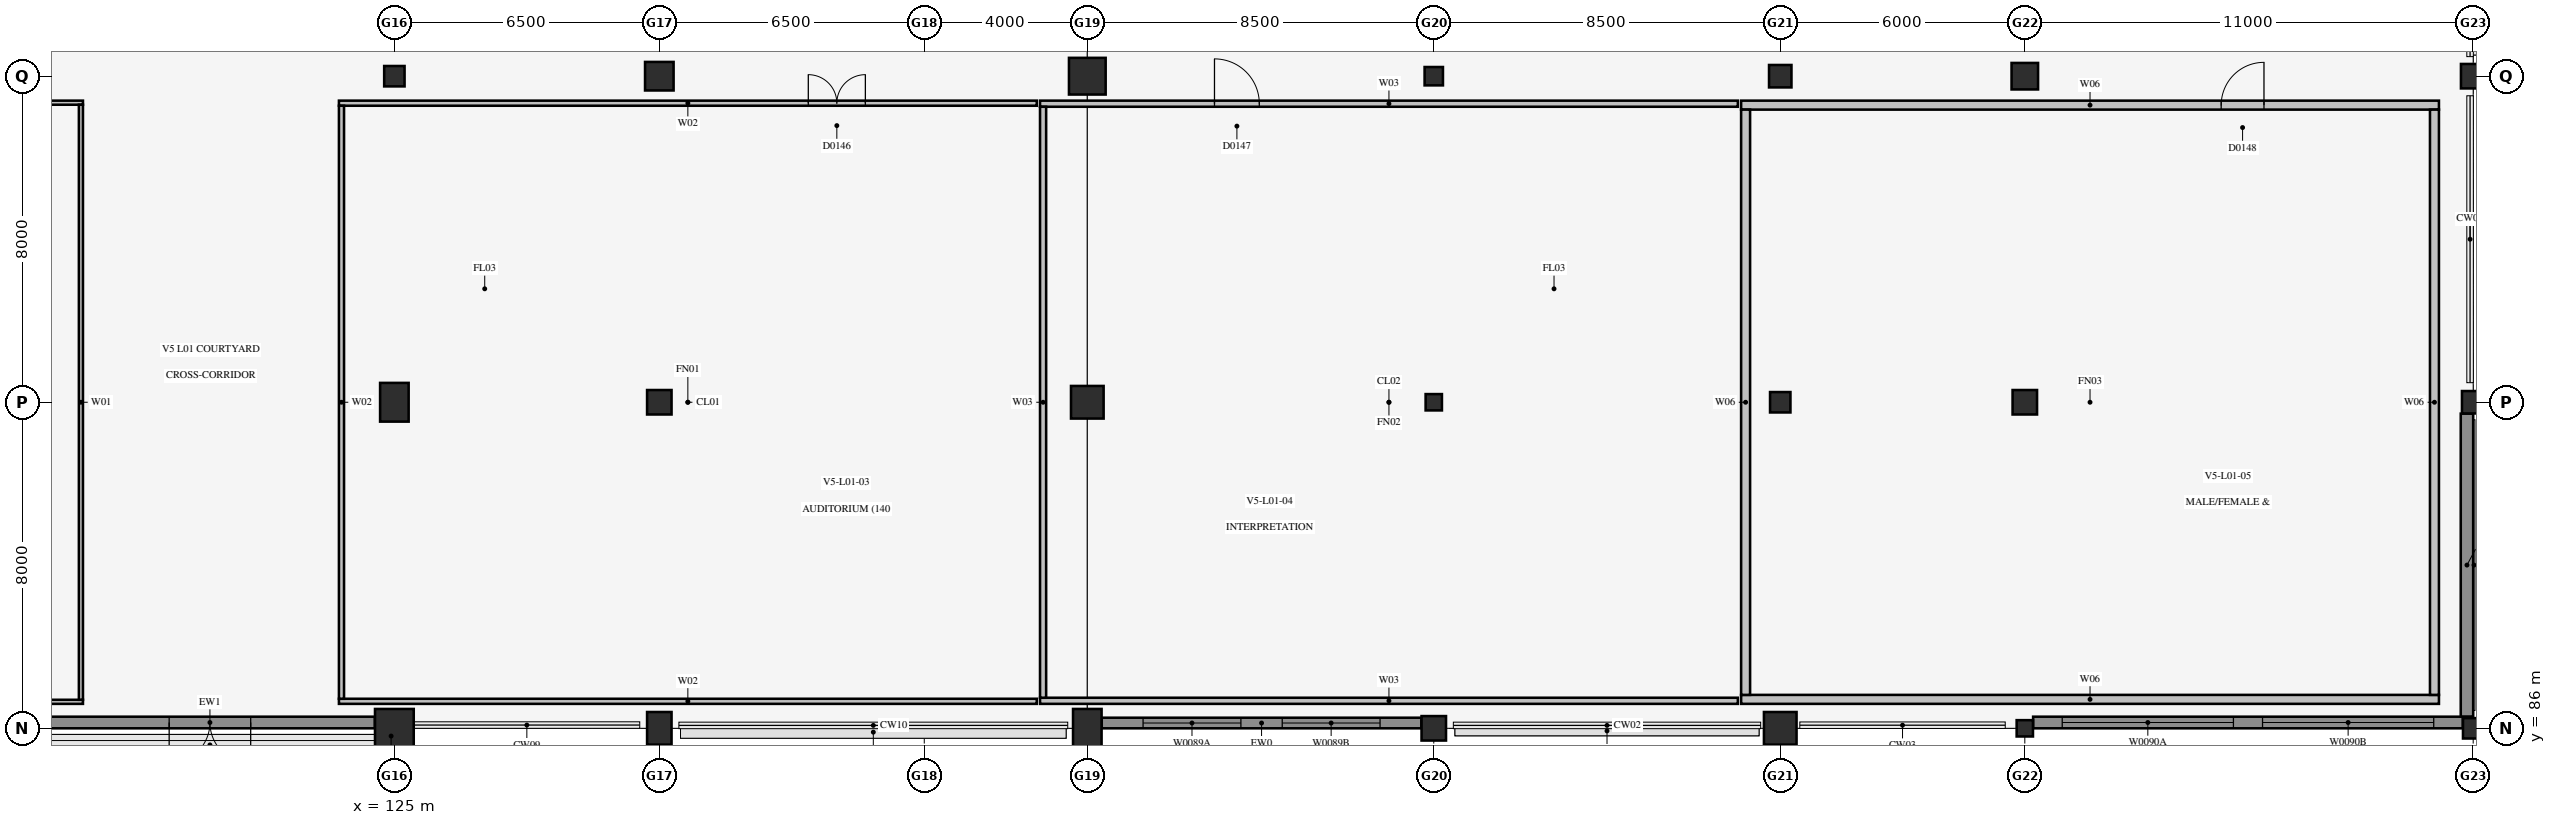
"""IFC4 building model, lengths in metres.
Left out: names, types, materials, properties, quantities, classifications, styles, units other than length and angle.
Written with IfcOpenShell. Run it as: python <this file> out.ifc"""

import sys

from ifc_helpers import new_model, si_unit, direction, frame, frame_2d, origin, origin_2d, place, context, subcontext, project, spatial, rectangle, circle, extrude, element, fill, save


model = new_model("IFC4")
c1 = context("Model", 3, precision=1e-05, world=origin(), true_north=direction((0.0, 1.0)))
c2 = subcontext(c1, "Body", "Model", "MODEL_VIEW")
j1 = project(units=[si_unit("LENGTHUNIT", "METRE"), si_unit("PLANEANGLEUNIT", "RADIAN")], contexts=[c1])
p1 = place(None, origin())
s1 = spatial("IfcSite", under=j1, at=p1, CompositionType="ELEMENT")
p2 = place(p1, origin())
s2 = spatial("IfcBuilding", under=s1, at=p2, CompositionType="ELEMENT")
p3 = place(p2, frame((0.0, 0.0, 5.4)))
s3 = spatial("IfcBuildingStorey", under=s2, at=p3, CompositionType="ELEMENT", Elevation=5.4)
p4 = place(p3, frame((125.0, 86.0, 0.0), z_axis=(0.0, 0.0, 1.0), x_axis=(1.0, 0.0, 0.0)))
e1 = element("IfcColumn", 1, at=p4, inside=s3, PredefinedType="COLUMN", context=c2, shape_type="SweptSolid", body=[
    extrude(rectangle(XDim=0.95, YDim=0.95, at=origin_2d()), origin(), (0.0, 0.0, 1.0), 4.8),
])
p5 = place(p3, frame((125.0, 94.0, 0.0), z_axis=(0.0, 0.0, 1.0), x_axis=(1.0, 0.0, 0.0)))
e2 = element("IfcColumn", 2, at=p5, inside=s3, PredefinedType="COLUMN", context=c2, shape_type="SweptSolid", body=[
    extrude(rectangle(XDim=0.7, YDim=0.95, at=origin_2d()), origin(), (0.0, 0.0, 1.0), 4.8),
])
p6 = place(p3, frame((125.0, 102.0, 0.0), z_axis=(0.0, 0.0, 1.0), x_axis=(1.0, 0.0, 0.0)))
e3 = element("IfcColumn", 3, at=p6, inside=s3, PredefinedType="COLUMN", context=c2, shape_type="SweptSolid", body=[
    extrude(circle(Radius=0.25, at=origin_2d()), origin(), (0.0, 0.0, 1.0), 4.8),
])
p7 = place(p3, frame((131.5, 86.0, 0.0), z_axis=(0.0, 0.0, 1.0), x_axis=(1.0, 0.0, 0.0)))
e4 = element("IfcColumn", 4, at=p7, inside=s3, PredefinedType="COLUMN", context=c2, shape_type="SweptSolid", body=[
    extrude(rectangle(XDim=0.6, YDim=0.8, at=origin_2d()), origin(), (0.0, 0.0, 1.0), 4.8),
])
p8 = place(p3, frame((131.5, 94.0, 0.0), z_axis=(0.0, 0.0, 1.0), x_axis=(1.0, 0.0, 0.0)))
e5 = element("IfcColumn", 5, at=p8, inside=s3, PredefinedType="COLUMN", context=c2, shape_type="SweptSolid", body=[
    extrude(circle(Radius=0.3, at=origin_2d()), origin(), (0.0, 0.0, 1.0), 4.8),
])
p9 = place(p3, frame((131.5, 102.0, 0.0), z_axis=(0.0, 0.0, 1.0), x_axis=(1.0, 0.0, 0.0)))
e6 = element("IfcColumn", 6, at=p9, inside=s3, PredefinedType="COLUMN", context=c2, shape_type="SweptSolid", body=[
    extrude(circle(Radius=0.35, at=origin_2d()), origin(), (0.0, 0.0, 1.0), 4.8),
])
p10 = place(p3, frame((142.0, 86.0, 0.0), z_axis=(0.0, 0.0, 1.0), x_axis=(1.0, 0.0, 0.0)))
e7 = element("IfcColumn", 7, at=p10, inside=s3, PredefinedType="COLUMN", context=c2, shape_type="SweptSolid", body=[
    extrude(rectangle(XDim=0.7, YDim=0.95, at=origin_2d()), origin(), (0.0, 0.0, 1.0), 4.8),
])
p11 = place(p3, frame((142.0, 94.0, 0.0), z_axis=(0.0, 0.0, 1.0), x_axis=(1.0, 0.0, 0.0)))
e8 = element("IfcColumn", 8, at=p11, inside=s3, PredefinedType="COLUMN", context=c2, shape_type="SweptSolid", body=[
    extrude(circle(Radius=0.4, at=origin_2d()), origin(), (0.0, 0.0, 1.0), 4.8),
])
p12 = place(p3, frame((142.0, 102.0, 0.0), z_axis=(0.0, 0.0, 1.0), x_axis=(1.0, 0.0, 0.0)))
e9 = element("IfcColumn", 9, at=p12, inside=s3, PredefinedType="COLUMN", context=c2, shape_type="SweptSolid", body=[
    extrude(circle(Radius=0.45, at=origin_2d()), origin(), (0.0, 0.0, 1.0), 4.8),
])
p13 = place(p3, frame((150.5, 86.0, 0.0), z_axis=(0.0, 0.0, 1.0), x_axis=(1.0, 0.0, 0.0)))
e10 = element("IfcColumn", 10, at=p13, inside=s3, PredefinedType="COLUMN", context=c2, shape_type="SweptSolid", body=[
    extrude(circle(Radius=0.3, at=origin_2d()), origin(), (0.0, 0.0, 1.0), 4.8),
])
p14 = place(p3, frame((150.5, 94.0, 0.0), z_axis=(0.0, 0.0, 1.0), x_axis=(1.0, 0.0, 0.0)))
e11 = element("IfcColumn", 11, at=p14, inside=s3, PredefinedType="COLUMN", context=c2, shape_type="SweptSolid", body=[
    extrude(rectangle(XDim=0.4, YDim=0.4, at=origin_2d()), origin(), (0.0, 0.0, 1.0), 4.8),
])
p15 = place(p3, frame((150.5, 102.0, 0.0), z_axis=(0.0, 0.0, 1.0), x_axis=(1.0, 0.0, 0.0)))
e12 = element("IfcColumn", 12, at=p15, inside=s3, PredefinedType="COLUMN", context=c2, shape_type="SweptSolid", body=[
    extrude(rectangle(XDim=0.45, YDim=0.45, at=origin_2d()), origin(), (0.0, 0.0, 1.0), 4.8),
])
p16 = place(p3, frame((159.0, 86.0, 0.0), z_axis=(0.0, 0.0, 1.0), x_axis=(1.0, 0.0, 0.0)))
e13 = element("IfcColumn", 13, at=p16, inside=s3, PredefinedType="COLUMN", context=c2, shape_type="SweptSolid", body=[
    extrude(circle(Radius=0.4, at=origin_2d()), origin(), (0.0, 0.0, 1.0), 4.8),
])
p17 = place(p3, frame((159.0, 94.0, 0.0), z_axis=(0.0, 0.0, 1.0), x_axis=(1.0, 0.0, 0.0)))
e14 = element("IfcColumn", 14, at=p17, inside=s3, PredefinedType="COLUMN", context=c2, shape_type="SweptSolid", body=[
    extrude(rectangle(XDim=0.5, YDim=0.5, at=origin_2d()), origin(), (0.0, 0.0, 1.0), 4.8),
])
p18 = place(p3, frame((159.0, 102.0, 0.0), z_axis=(0.0, 0.0, 1.0), x_axis=(1.0, 0.0, 0.0)))
e15 = element("IfcColumn", 15, at=p18, inside=s3, PredefinedType="COLUMN", context=c2, shape_type="SweptSolid", body=[
    extrude(rectangle(XDim=0.55, YDim=0.55, at=origin_2d()), origin(), (0.0, 0.0, 1.0), 4.8),
])
p19 = place(p3, frame((165.0, 86.0, 0.0), z_axis=(0.0, 0.0, 1.0), x_axis=(1.0, 0.0, 0.0)))
e16 = element("IfcColumn", 16, at=p19, inside=s3, PredefinedType="COLUMN", context=c2, shape_type="SweptSolid", body=[
    extrude(rectangle(XDim=0.4, YDim=0.4, at=origin_2d()), origin(), (0.0, 0.0, 1.0), 4.8),
])
p20 = place(p3, frame((165.0, 94.0, 0.0), z_axis=(0.0, 0.0, 1.0), x_axis=(1.0, 0.0, 0.0)))
e17 = element("IfcColumn", 17, at=p20, inside=s3, PredefinedType="COLUMN", context=c2, shape_type="SweptSolid", body=[
    extrude(rectangle(XDim=0.6, YDim=0.6, at=origin_2d()), origin(), (0.0, 0.0, 1.0), 4.8),
])
p21 = place(p3, frame((165.0, 102.0, 0.0), z_axis=(0.0, 0.0, 1.0), x_axis=(1.0, 0.0, 0.0)))
e18 = element("IfcColumn", 18, at=p21, inside=s3, PredefinedType="COLUMN", context=c2, shape_type="SweptSolid", body=[
    extrude(rectangle(XDim=0.65, YDim=0.65, at=origin_2d()), origin(), (0.0, 0.0, 1.0), 4.8),
])
p22 = place(p3, frame((176.0, 86.0, 0.0), z_axis=(0.0, 0.0, 1.0), x_axis=(1.0, 0.0, 0.0)))
e19 = element("IfcColumn", 19, at=p22, inside=s3, PredefinedType="COLUMN", context=c2, shape_type="SweptSolid", body=[
    extrude(rectangle(XDim=0.5, YDim=0.5, at=origin_2d()), origin(), (0.0, 0.0, 1.0), 4.8),
])
p23 = place(p3, frame((176.0, 94.0, 0.0), z_axis=(0.0, 0.0, 1.0), x_axis=(1.0, 0.0, 0.0)))
e20 = element("IfcColumn", 20, at=p23, inside=s3, PredefinedType="COLUMN", context=c2, shape_type="SweptSolid", body=[
    extrude(rectangle(XDim=0.55, YDim=0.55, at=origin_2d()), origin(), (0.0, 0.0, 1.0), 4.8),
])
p24 = place(p3, frame((176.0, 102.0, 0.0), z_axis=(0.0, 0.0, 1.0), x_axis=(1.0, 0.0, 0.0)))
e21 = element("IfcColumn", 21, at=p24, inside=s3, PredefinedType="COLUMN", context=c2, shape_type="SweptSolid", body=[
    extrude(rectangle(XDim=0.6, YDim=0.6, at=origin_2d()), origin(), (0.0, 0.0, 1.0), 4.8),
])
p25 = place(p3, frame((108.14, 86.65, 0.0), z_axis=(0.0, 0.0, 1.0), x_axis=(1.0, 0.0, 0.0)))
e22 = element("IfcWall", 22, at=p25, inside=s3, PredefinedType="PARTITIONING", context=c2, shape_type="SweptSolid", body=[
    extrude(rectangle(XDim=9.22, YDim=0.1, at=frame_2d((4.61, 0.0))), origin(), (0.0, 0.0, 1.0), 4.545),
])
p26 = place(p3, frame((108.14, 101.35, 0.0), z_axis=(0.0, 0.0, 1.0), x_axis=(1.0, 0.0, 0.0)))
e23 = element("IfcWall", 23, at=p26, inside=s3, PredefinedType="PARTITIONING", context=c2, shape_type="SweptSolid", body=[
    extrude(rectangle(XDim=9.22, YDim=0.1, at=frame_2d((4.61, 0.0))), origin(), (0.0, 0.0, 1.0), 4.545),
])
p27 = place(p26, frame((3.275, 0.0, 0.0)))
e24 = element("IfcOpeningElement", 24, at=p27, cuts=e23, PredefinedType="OPENING", context=c2, shape_type="SweptSolid", body=[
    extrude(rectangle(XDim=0.95, YDim=2.15, at=frame_2d((0.475, 1.075))), frame((0.0, 0.062, 0.0), z_axis=(0.0, -1.0, 0.0), x_axis=(1.0, 0.0, 0.0)), (0.0, 0.0, 1.0), 0.124),
])
p28 = place(p3, frame((117.31, 86.7, 0.0), z_axis=(0.0, 0.0, 1.0), x_axis=(0.0, 1.0, 0.0)))
e25 = element("IfcWall", 25, at=p28, inside=s3, PredefinedType="PARTITIONING", context=c2, shape_type="SweptSolid", body=[
    extrude(rectangle(XDim=14.6, YDim=0.1, at=frame_2d((7.3, 0.0))), origin(), (0.0, 0.0, 1.0), 4.545),
])
p29 = place(p3, frame((123.64, 86.663, 0.0), z_axis=(0.0, 0.0, 1.0), x_axis=(1.0, 0.0, 0.0)))
e26 = element("IfcWall", 26, at=p29, inside=s3, PredefinedType="PARTITIONING", context=c2, shape_type="SweptSolid", body=[
    extrude(rectangle(XDim=17.12, YDim=0.125, at=frame_2d((8.56, 0.0))), origin(), (0.0, 0.0, 1.0), 4.545),
])
p30 = place(p3, frame((123.64, 101.337, 0.0), z_axis=(0.0, 0.0, 1.0), x_axis=(1.0, 0.0, 0.0)))
e27 = element("IfcWall", 27, at=p30, inside=s3, PredefinedType="PARTITIONING", context=c2, shape_type="SweptSolid", body=[
    extrude(rectangle(XDim=17.12, YDim=0.125, at=frame_2d((8.56, 0.0))), origin(), (0.0, 0.0, 1.0), 4.545),
])
p31 = place(p30, frame((11.515, 0.0, 0.0)))
e28 = element("IfcOpeningElement", 28, at=p31, cuts=e27, PredefinedType="OPENING", context=c2, shape_type="SweptSolid", body=[
    extrude(rectangle(XDim=1.4, YDim=2.2, at=frame_2d((0.7, 1.1))), frame((0.0, 0.074, 0.0), z_axis=(0.0, -1.0, 0.0), x_axis=(1.0, 0.0, 0.0)), (0.0, 0.0, 1.0), 0.149),
])
p32 = place(p3, frame((123.702, 86.725, 0.0), z_axis=(0.0, 0.0, 1.0), x_axis=(0.0, 1.0, 0.0)))
e29 = element("IfcWall", 29, at=p32, inside=s3, PredefinedType="PARTITIONING", context=c2, shape_type="SweptSolid", body=[
    extrude(rectangle(XDim=14.55, YDim=0.125, at=frame_2d((7.275, 0.0))), origin(), (0.0, 0.0, 1.0), 4.545),
])
p33 = place(p3, frame((140.84, 86.675, 0.0), z_axis=(0.0, 0.0, 1.0), x_axis=(1.0, 0.0, 0.0)))
e30 = element("IfcWall", 30, at=p33, inside=s3, PredefinedType="PARTITIONING", context=c2, shape_type="SweptSolid", body=[
    extrude(rectangle(XDim=17.12, YDim=0.15, at=frame_2d((8.56, 0.0))), origin(), (0.0, 0.0, 1.0), 4.545),
])
p34 = place(p3, frame((140.84, 101.325, 0.0), z_axis=(0.0, 0.0, 1.0), x_axis=(1.0, 0.0, 0.0)))
e31 = element("IfcWall", 31, at=p34, inside=s3, PredefinedType="PARTITIONING", context=c2, shape_type="SweptSolid", body=[
    extrude(rectangle(XDim=17.12, YDim=0.15, at=frame_2d((8.56, 0.0))), origin(), (0.0, 0.0, 1.0), 4.545),
])
p35 = place(p34, frame((4.28, 0.0, 0.0)))
e32 = element("IfcOpeningElement", 32, at=p35, cuts=e31, PredefinedType="OPENING", context=c2, shape_type="SweptSolid", body=[
    extrude(rectangle(XDim=1.1, YDim=2.25, at=frame_2d((0.55, 1.125))), frame((0.0, 0.087, 0.0), z_axis=(0.0, -1.0, 0.0), x_axis=(1.0, 0.0, 0.0)), (0.0, 0.0, 1.0), 0.174),
])
p36 = place(p3, frame((140.915, 86.75, 0.0), z_axis=(0.0, 0.0, 1.0), x_axis=(0.0, 1.0, 0.0)))
e33 = element("IfcWall", 33, at=p36, inside=s3, PredefinedType="PARTITIONING", context=c2, shape_type="SweptSolid", body=[
    extrude(rectangle(XDim=14.5, YDim=0.15, at=frame_2d((7.25, 0.0))), origin(), (0.0, 0.0, 1.0), 4.545),
])
p37 = place(p3, frame((158.04, 86.71, 0.0), z_axis=(0.0, 0.0, 1.0), x_axis=(1.0, 0.0, 0.0)))
e34 = element("IfcWall", 34, at=p37, inside=s3, PredefinedType="PLUMBINGWALL", context=c2, shape_type="SweptSolid", body=[
    extrude(rectangle(XDim=17.12, YDim=0.22, at=frame_2d((8.56, 0.0))), origin(), (0.0, 0.0, 1.0), 4.545),
])
p38 = place(p3, frame((158.04, 101.29, 0.0), z_axis=(0.0, 0.0, 1.0), x_axis=(1.0, 0.0, 0.0)))
e35 = element("IfcWall", 35, at=p38, inside=s3, PredefinedType="PLUMBINGWALL", context=c2, shape_type="SweptSolid", body=[
    extrude(rectangle(XDim=17.12, YDim=0.22, at=frame_2d((8.56, 0.0))), origin(), (0.0, 0.0, 1.0), 4.545),
])
p39 = place(p38, frame((11.778, 0.0, 0.0)))
e36 = element("IfcOpeningElement", 36, at=p39, cuts=e35, PredefinedType="OPENING", context=c2, shape_type="SweptSolid", body=[
    extrude(rectangle(XDim=1.05, YDim=2.15, at=frame_2d((0.525, 1.075))), frame((0.0, 0.122, 0.0), z_axis=(0.0, -1.0, 0.0), x_axis=(1.0, 0.0, 0.0)), (0.0, 0.0, 1.0), 0.244),
])
for number, where, z_axis, x_axis in (
    (37, (175.05, 86.82, 0.0), (0.0, 0.0, 1.0), (0.0, 1.0, 0.0)),
    (38, (158.15, 86.82, 0.0), (0.0, 0.0, 1.0), (0.0, 1.0, 0.0)),
):
    element("IfcWall", number, at=place(p3, frame(where, z_axis=z_axis, x_axis=x_axis)), inside=s3, PredefinedType="PLUMBINGWALL", context=c2, shape_type="SweptSolid", body=[
        extrude(rectangle(XDim=14.36, YDim=0.22, at=frame_2d((7.18, 0.0))), origin(), (0.0, 0.0, 1.0), 4.545),
    ])
p40 = place(p3, frame((116.429, 86.143, 0.0), z_axis=(0.0, 0.0, 1.0), x_axis=(1.0, 0.0, 0.0)))
e39 = element("IfcWall", 39, at=p40, inside=s3, PredefinedType="SOLIDWALL", context=c2, shape_type="SweptSolid", body=[
    extrude(rectangle(XDim=8.092, YDim=0.285, at=frame_2d((4.046, 0.0))), origin(), (0.0, 0.0, 1.0), 3.918),
])
p41 = place(p40, frame((3.046, 0.0, 0.0)))
e40 = element("IfcOpeningElement", 40, at=p41, cuts=e39, PredefinedType="OPENING", context=c2, shape_type="SweptSolid", body=[
    extrude(rectangle(XDim=2.0, YDim=2.4, at=frame_2d((1.0, 1.2))), frame((0.0, 0.154, 0.0), z_axis=(0.0, -1.0, 0.0), x_axis=(1.0, 0.0, 0.0)), (0.0, 0.0, 1.0), 0.309),
])
p42 = place(p3, frame((142.354, 86.13, 0.0), z_axis=(0.0, 0.0, 1.0), x_axis=(1.0, 0.0, 0.0)))
e41 = element("IfcWall", 41, at=p42, inside=s3, PredefinedType="SOLIDWALL", context=c2, shape_type="SweptSolid", body=[
    extrude(rectangle(XDim=7.842, YDim=0.26, at=frame_2d((3.921, 0.0))), origin(), (0.0, 0.0, 1.0), 3.994),
])
p43 = place(p42, frame((1.014, 0.0, 0.95)))
e42 = element("IfcOpeningElement", 42, at=p43, cuts=e41, PredefinedType="OPENING", context=c2, shape_type="SweptSolid", body=[
    extrude(rectangle(XDim=2.4, YDim=2.1, at=frame_2d((1.2, 1.05))), frame((0.0, 0.142, 0.0), z_axis=(0.0, -1.0, 0.0), x_axis=(1.0, 0.0, 0.0)), (0.0, 0.0, 1.0), 0.284),
])
p44 = place(p42, frame((4.428, 0.0, 0.95)))
e43 = element("IfcOpeningElement", 43, at=p44, cuts=e41, PredefinedType="OPENING", context=c2, shape_type="SweptSolid", body=[
    extrude(rectangle(XDim=2.4, YDim=2.1, at=frame_2d((1.2, 1.05))), frame((0.0, 0.142, 0.0), z_axis=(0.0, -1.0, 0.0), x_axis=(1.0, 0.0, 0.0)), (0.0, 0.0, 1.0), 0.284),
])
p45 = place(p3, frame((165.204, 86.143, 0.0), z_axis=(0.0, 0.0, 1.0), x_axis=(1.0, 0.0, 0.0)))
e44 = element("IfcWall", 44, at=p45, inside=s3, PredefinedType="SOLIDWALL", context=c2, shape_type="SweptSolid", body=[
    extrude(rectangle(XDim=10.542, YDim=0.285, at=frame_2d((5.271, 0.0))), origin(), (0.0, 0.0, 1.0), 4.07),
])
p46 = place(p45, frame((0.714, 0.0, 0.95)))
e45 = element("IfcOpeningElement", 45, at=p46, cuts=e44, PredefinedType="OPENING", context=c2, shape_type="SweptSolid", body=[
    extrude(rectangle(XDim=4.2, YDim=2.1, at=frame_2d((2.1, 1.05))), frame((0.0, 0.154, 0.0), z_axis=(0.0, -1.0, 0.0), x_axis=(1.0, 0.0, 0.0)), (0.0, 0.0, 1.0), 0.309),
])
p47 = place(p45, frame((5.628, 0.0, 0.95)))
e46 = element("IfcOpeningElement", 46, at=p47, cuts=e44, PredefinedType="OPENING", context=c2, shape_type="SweptSolid", body=[
    extrude(rectangle(XDim=4.2, YDim=2.1, at=frame_2d((2.1, 1.05))), frame((0.0, 0.154, 0.0), z_axis=(0.0, -1.0, 0.0), x_axis=(1.0, 0.0, 0.0)), (0.0, 0.0, 1.0), 0.309),
])
p48 = place(p3, frame((175.847, 86.289, 0.0), z_axis=(0.0, 0.0, 1.0), x_axis=(0.0, 1.0, 0.0)))
e47 = element("IfcWall", 47, at=p48, inside=s3, PredefinedType="SOLIDWALL", context=c2, shape_type="SweptSolid", body=[
    extrude(rectangle(XDim=7.432, YDim=0.305, at=frame_2d((3.716, 0.0))), origin(), (0.0, 0.0, 1.0), 3.918),
])
p49 = place(p31, frame((1.4, 0.0, 0.0), z_axis=(0.0, 0.0, 1.0), x_axis=(-1.0, 0.0, 0.0)))
e48 = element("IfcDoor", 48, at=p49, inside=s3, OperationType="DOUBLE_DOOR_SINGLE_SWING", PredefinedType="DOOR", context=c2, shape_type="SweptSolid", body=[
    extrude(rectangle(XDim=1.4, YDim=2.2, at=frame_2d((0.7, 1.1))), frame((0.0, 0.025, 0.0), z_axis=(0.0, -1.0, 0.0), x_axis=(1.0, 0.0, 0.0)), (0.0, 0.0, 1.0), 0.05),
])
fill(e28, e48)
p50 = place(p35, frame((1.1, 0.0, 0.0), z_axis=(0.0, 0.0, 1.0), x_axis=(-1.0, 0.0, 0.0)))
e49 = element("IfcDoor", 49, at=p50, inside=s3, OperationType="SINGLE_SWING_LEFT", PredefinedType="DOOR", context=c2, shape_type="SweptSolid", body=[
    extrude(rectangle(XDim=1.1, YDim=2.25, at=frame_2d((0.55, 1.125))), frame((0.0, 0.025, 0.0), z_axis=(0.0, -1.0, 0.0), x_axis=(1.0, 0.0, 0.0)), (0.0, 0.0, 1.0), 0.05),
])
fill(e32, e49)
p51 = place(p39, frame((1.05, 0.0, 0.0), z_axis=(0.0, 0.0, 1.0), x_axis=(-1.0, 0.0, 0.0)))
e50 = element("IfcDoor", 50, at=p51, inside=s3, OperationType="SINGLE_SWING_RIGHT", PredefinedType="DOOR", context=c2, shape_type="SweptSolid", body=[
    extrude(rectangle(XDim=1.05, YDim=2.15, at=frame_2d((0.525, 1.075))), frame((0.0, 0.025, 0.0), z_axis=(0.0, -1.0, 0.0), x_axis=(1.0, 0.0, 0.0)), (0.0, 0.0, 1.0), 0.05),
])
fill(e36, e50)
p52 = place(p41, frame((2.0, 0.0, 0.0), z_axis=(0.0, 0.0, 1.0), x_axis=(-1.0, 0.0, 0.0)))
e51 = element("IfcDoor", 51, at=p52, inside=s3, OperationType="DOUBLE_DOOR_SINGLE_SWING", PredefinedType="DOOR", context=c2, shape_type="SweptSolid", body=[
    extrude(rectangle(XDim=2.0, YDim=2.4, at=frame_2d((1.0, 1.2))), frame((0.0, 0.025, 0.0), z_axis=(0.0, -1.0, 0.0), x_axis=(1.0, 0.0, 0.0)), (0.0, 0.0, 1.0), 0.05),
])
fill(e40, e51)
p53 = place(p43, origin())
e52 = element("IfcWindow", 52, at=p53, inside=s3, PartitioningType="SINGLE_PANEL", PredefinedType="WINDOW", context=c2, shape_type="SweptSolid", body=[
    extrude(rectangle(XDim=2.4, YDim=2.1, at=frame_2d((1.2, 1.05))), frame((0.0, 0.03, 0.0), z_axis=(0.0, -1.0, 0.0), x_axis=(1.0, 0.0, 0.0)), (0.0, 0.0, 1.0), 0.06),
])
fill(e42, e52)
p54 = place(p44, origin())
e53 = element("IfcWindow", 53, at=p54, inside=s3, PartitioningType="SINGLE_PANEL", PredefinedType="WINDOW", context=c2, shape_type="SweptSolid", body=[
    extrude(rectangle(XDim=2.4, YDim=2.1, at=frame_2d((1.2, 1.05))), frame((0.0, 0.03, 0.0), z_axis=(0.0, -1.0, 0.0), x_axis=(1.0, 0.0, 0.0)), (0.0, 0.0, 1.0), 0.06),
])
fill(e43, e53)
p55 = place(p46, origin())
e54 = element("IfcWindow", 54, at=p55, inside=s3, PartitioningType="SINGLE_PANEL", PredefinedType="WINDOW", context=c2, shape_type="SweptSolid", body=[
    extrude(rectangle(XDim=4.2, YDim=2.1, at=frame_2d((2.1, 1.05))), frame((0.0, 0.03, 0.0), z_axis=(0.0, -1.0, 0.0), x_axis=(1.0, 0.0, 0.0)), (0.0, 0.0, 1.0), 0.06),
])
fill(e45, e54)
p56 = place(p47, origin())
e55 = element("IfcWindow", 55, at=p56, inside=s3, PartitioningType="SINGLE_PANEL", PredefinedType="WINDOW", context=c2, shape_type="SweptSolid", body=[
    extrude(rectangle(XDim=4.2, YDim=2.1, at=frame_2d((2.1, 1.05))), frame((0.0, 0.03, 0.0), z_axis=(0.0, -1.0, 0.0), x_axis=(1.0, 0.0, 0.0)), (0.0, 0.0, 1.0), 0.06),
])
fill(e46, e55)
save(model, sys.argv[1])
